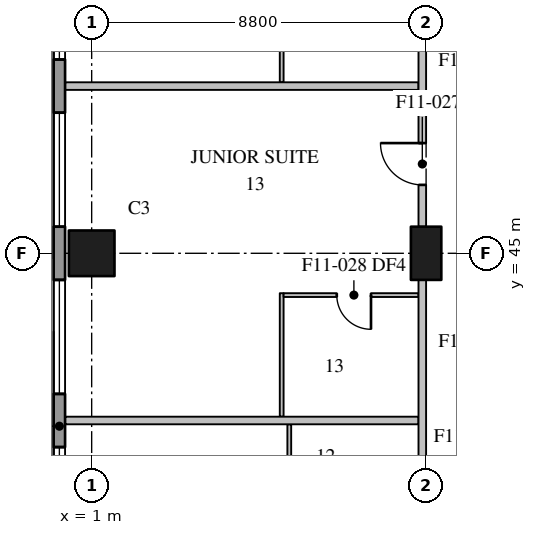
"""IFC4 building model, lengths in metres.
Left out: names, types, materials, properties, quantities, classifications, styles, units other than length and angle.
Written with IfcOpenShell. Run it as: python <this file> out.ifc"""

import sys

from ifc_helpers import new_model, si_unit, direction, frame, frame_2d, origin, origin_2d, place, context, subcontext, project, spatial, rectangle, extrude, element, fill, save


model = new_model("IFC4")
c1 = context("Model", 3, precision=1e-05, world=origin(), true_north=direction((0.0, 1.0)))
c2 = subcontext(c1, "Body", "Model", "MODEL_VIEW")
j1 = project(units=[si_unit("LENGTHUNIT", "METRE"), si_unit("PLANEANGLEUNIT", "RADIAN")], contexts=[c1])
p1 = place(None, origin())
s1 = spatial("IfcSite", under=j1, at=p1, CompositionType="ELEMENT")
p2 = place(p1, origin())
s2 = spatial("IfcBuilding", under=s1, at=p2, CompositionType="ELEMENT")
p3 = place(p2, frame((0.0, 0.0, 111.1)))
s3 = spatial("IfcBuildingStorey", under=s2, at=p3, CompositionType="ELEMENT", Elevation=111.1)
p4 = place(p3, frame((1.0, 45.0, 0.0), z_axis=(0.0, 0.0, 1.0), x_axis=(1.0, 0.0, 0.0)))
e1 = element("IfcColumn", 1, at=p4, inside=s3, PredefinedType="COLUMN", context=c2, shape_type="SweptSolid", body=[
    extrude(rectangle(XDim=1.2, YDim=1.2, at=origin_2d()), origin(), (0.0, 0.0, 1.0), 3.7),
])
p5 = place(p3, frame((9.8, 45.0, 0.0), z_axis=(0.0, 0.0, 1.0), x_axis=(0.0, 1.0, 0.0)))
e2 = element("IfcColumn", 2, at=p5, inside=s3, PredefinedType="COLUMN", context=c2, shape_type="SweptSolid", body=[
    extrude(rectangle(XDim=1.4, YDim=0.8, at=origin_2d()), origin(), (0.0, 0.0, 1.0), 3.7),
])
p6 = place(p3, frame((0.15, 78.7, 0.0), z_axis=(0.0, 0.0, 1.0), x_axis=(0.0, -1.0, 0.0)))
e3 = element("IfcWall", 3, at=p6, inside=s3, PredefinedType="STANDARD", context=c2, shape_type="SweptSolid", body=[
    extrude(rectangle(XDim=76.5, YDim=0.3, at=frame_2d((38.25, 0.0))), origin(), (0.0, 0.0, 1.0), 3.4),
])
p7 = place(p6, frame((3.6, 0.0, 0.75)))
e4 = element("IfcOpeningElement", 4, at=p7, cuts=e3, PredefinedType="OPENING", context=c2, shape_type="SweptSolid", body=[
    extrude(rectangle(XDim=3.0, YDim=2.3, at=frame_2d((1.5, 1.15))), frame((0.0, 0.16, 0.0), z_axis=(0.0, -1.0, 0.0), x_axis=(1.0, 0.0, 0.0)), (0.0, 0.0, 1.0), 0.32),
])
p8 = place(p6, frame((8.0, 0.0, 0.75)))
e5 = element("IfcOpeningElement", 5, at=p8, cuts=e3, PredefinedType="OPENING", context=c2, shape_type="SweptSolid", body=[
    extrude(rectangle(XDim=3.0, YDim=2.3, at=frame_2d((1.5, 1.15))), frame((0.0, 0.16, 0.0), z_axis=(0.0, -1.0, 0.0), x_axis=(1.0, 0.0, 0.0)), (0.0, 0.0, 1.0), 0.32),
])
p9 = place(p6, frame((12.4, 0.0, 0.75)))
e6 = element("IfcOpeningElement", 6, at=p9, cuts=e3, PredefinedType="OPENING", context=c2, shape_type="SweptSolid", body=[
    extrude(rectangle(XDim=3.0, YDim=2.3, at=frame_2d((1.5, 1.15))), frame((0.0, 0.16, 0.0), z_axis=(0.0, -1.0, 0.0), x_axis=(1.0, 0.0, 0.0)), (0.0, 0.0, 1.0), 0.32),
])
p10 = place(p6, frame((16.8, 0.0, 0.75)))
e7 = element("IfcOpeningElement", 7, at=p10, cuts=e3, PredefinedType="OPENING", context=c2, shape_type="SweptSolid", body=[
    extrude(rectangle(XDim=3.0, YDim=2.3, at=frame_2d((1.5, 1.15))), frame((0.0, 0.16, 0.0), z_axis=(0.0, -1.0, 0.0), x_axis=(1.0, 0.0, 0.0)), (0.0, 0.0, 1.0), 0.32),
])
p11 = place(p6, frame((21.2, 0.0, 0.75)))
e8 = element("IfcOpeningElement", 8, at=p11, cuts=e3, PredefinedType="OPENING", context=c2, shape_type="SweptSolid", body=[
    extrude(rectangle(XDim=3.0, YDim=2.3, at=frame_2d((1.5, 1.15))), frame((0.0, 0.16, 0.0), z_axis=(0.0, -1.0, 0.0), x_axis=(1.0, 0.0, 0.0)), (0.0, 0.0, 1.0), 0.32),
])
p12 = place(p6, frame((25.6, 0.0, 0.75)))
e9 = element("IfcOpeningElement", 9, at=p12, cuts=e3, PredefinedType="OPENING", context=c2, shape_type="SweptSolid", body=[
    extrude(rectangle(XDim=3.0, YDim=2.3, at=frame_2d((1.5, 1.15))), frame((0.0, 0.16, 0.0), z_axis=(0.0, -1.0, 0.0), x_axis=(1.0, 0.0, 0.0)), (0.0, 0.0, 1.0), 0.32),
])
p13 = place(p6, frame((30.0, 0.0, 0.75)))
e10 = element("IfcOpeningElement", 10, at=p13, cuts=e3, PredefinedType="OPENING", context=c2, shape_type="SweptSolid", body=[
    extrude(rectangle(XDim=3.0, YDim=2.3, at=frame_2d((1.5, 1.15))), frame((0.0, 0.16, 0.0), z_axis=(0.0, -1.0, 0.0), x_axis=(1.0, 0.0, 0.0)), (0.0, 0.0, 1.0), 0.32),
])
p14 = place(p6, frame((34.4, 0.0, 0.75)))
e11 = element("IfcOpeningElement", 11, at=p14, cuts=e3, PredefinedType="OPENING", context=c2, shape_type="SweptSolid", body=[
    extrude(rectangle(XDim=3.0, YDim=2.3, at=frame_2d((1.5, 1.15))), frame((0.0, 0.16, 0.0), z_axis=(0.0, -1.0, 0.0), x_axis=(1.0, 0.0, 0.0)), (0.0, 0.0, 1.0), 0.32),
])
p15 = place(p6, frame((38.8, 0.0, 0.75)))
e12 = element("IfcOpeningElement", 12, at=p15, cuts=e3, PredefinedType="OPENING", context=c2, shape_type="SweptSolid", body=[
    extrude(rectangle(XDim=3.0, YDim=2.3, at=frame_2d((1.5, 1.15))), frame((0.0, 0.16, 0.0), z_axis=(0.0, -1.0, 0.0), x_axis=(1.0, 0.0, 0.0)), (0.0, 0.0, 1.0), 0.32),
])
p16 = place(p6, frame((43.2, 0.0, 0.75)))
e13 = element("IfcOpeningElement", 13, at=p16, cuts=e3, PredefinedType="OPENING", context=c2, shape_type="SweptSolid", body=[
    extrude(rectangle(XDim=3.0, YDim=2.3, at=frame_2d((1.5, 1.15))), frame((0.0, 0.16, 0.0), z_axis=(0.0, -1.0, 0.0), x_axis=(1.0, 0.0, 0.0)), (0.0, 0.0, 1.0), 0.32),
])
p17 = place(p6, frame((47.6, 0.0, 0.75)))
e14 = element("IfcOpeningElement", 14, at=p17, cuts=e3, PredefinedType="OPENING", context=c2, shape_type="SweptSolid", body=[
    extrude(rectangle(XDim=3.0, YDim=2.3, at=frame_2d((1.5, 1.15))), frame((0.0, 0.16, 0.0), z_axis=(0.0, -1.0, 0.0), x_axis=(1.0, 0.0, 0.0)), (0.0, 0.0, 1.0), 0.32),
])
p18 = place(p6, frame((52.0, 0.0, 0.75)))
e15 = element("IfcOpeningElement", 15, at=p18, cuts=e3, PredefinedType="OPENING", context=c2, shape_type="SweptSolid", body=[
    extrude(rectangle(XDim=3.0, YDim=2.3, at=frame_2d((1.5, 1.15))), frame((0.0, 0.16, 0.0), z_axis=(0.0, -1.0, 0.0), x_axis=(1.0, 0.0, 0.0)), (0.0, 0.0, 1.0), 0.32),
])
p19 = place(p6, frame((56.4, 0.0, 0.75)))
e16 = element("IfcOpeningElement", 16, at=p19, cuts=e3, PredefinedType="OPENING", context=c2, shape_type="SweptSolid", body=[
    extrude(rectangle(XDim=3.0, YDim=2.3, at=frame_2d((1.5, 1.15))), frame((0.0, 0.16, 0.0), z_axis=(0.0, -1.0, 0.0), x_axis=(1.0, 0.0, 0.0)), (0.0, 0.0, 1.0), 0.32),
])
p20 = place(p6, frame((60.8, 0.0, 0.75)))
e17 = element("IfcOpeningElement", 17, at=p20, cuts=e3, PredefinedType="OPENING", context=c2, shape_type="SweptSolid", body=[
    extrude(rectangle(XDim=3.0, YDim=2.3, at=frame_2d((1.5, 1.15))), frame((0.0, 0.16, 0.0), z_axis=(0.0, -1.0, 0.0), x_axis=(1.0, 0.0, 0.0)), (0.0, 0.0, 1.0), 0.32),
])
p21 = place(p6, frame((65.2, 0.0, 0.75)))
e18 = element("IfcOpeningElement", 18, at=p21, cuts=e3, PredefinedType="OPENING", context=c2, shape_type="SweptSolid", body=[
    extrude(rectangle(XDim=3.0, YDim=2.3, at=frame_2d((1.5, 1.15))), frame((0.0, 0.16, 0.0), z_axis=(0.0, -1.0, 0.0), x_axis=(1.0, 0.0, 0.0)), (0.0, 0.0, 1.0), 0.32),
])
p22 = place(p6, frame((69.6, 0.0, 0.75)))
e19 = element("IfcOpeningElement", 19, at=p22, cuts=e3, PredefinedType="OPENING", context=c2, shape_type="SweptSolid", body=[
    extrude(rectangle(XDim=3.0, YDim=2.3, at=frame_2d((1.5, 1.15))), frame((0.0, 0.16, 0.0), z_axis=(0.0, -1.0, 0.0), x_axis=(1.0, 0.0, 0.0)), (0.0, 0.0, 1.0), 0.32),
])
p23 = place(p3, frame((9.7, 36.9, 0.0), z_axis=(0.0, 0.0, 1.0), x_axis=(0.0, 1.0, 0.0)))
e20 = element("IfcWall", 20, at=p23, inside=s3, PredefinedType="PARTITIONING", context=c2, shape_type="SweptSolid", body=[
    extrude(rectangle(XDim=7.4, YDim=0.2, at=frame_2d((3.7, 0.0))), origin(), (0.0, 0.0, 1.0), 3.4),
])
p24 = place(p23, frame((0.05, 0.0, 0.0)))
e21 = element("IfcOpeningElement", 21, at=p24, cuts=e20, PredefinedType="OPENING", context=c2, shape_type="SweptSolid", body=[
    extrude(rectangle(XDim=1.0, YDim=2.1, at=frame_2d((0.5, 1.05))), frame((0.0, 0.11, 0.0), z_axis=(0.0, -1.0, 0.0), x_axis=(1.0, 0.0, 0.0)), (0.0, 0.0, 1.0), 0.22),
])
p25 = place(p3, frame((9.7, 45.7, 0.0), z_axis=(0.0, 0.0, 1.0), x_axis=(0.0, 1.0, 0.0)))
e22 = element("IfcWall", 22, at=p25, inside=s3, PredefinedType="PARTITIONING", context=c2, shape_type="SweptSolid", body=[
    extrude(rectangle(XDim=7.4, YDim=0.2, at=frame_2d((3.7, 0.0))), origin(), (0.0, 0.0, 1.0), 3.4),
])
p26 = place(p25, frame((1.1, 0.0, 0.0)))
e23 = element("IfcOpeningElement", 23, at=p26, cuts=e22, PredefinedType="OPENING", context=c2, shape_type="SweptSolid", body=[
    extrude(rectangle(XDim=1.1, YDim=2.1, at=frame_2d((0.55, 1.05))), frame((0.0, 0.11, 0.0), z_axis=(0.0, -1.0, 0.0), x_axis=(1.0, 0.0, 0.0)), (0.0, 0.0, 1.0), 0.22),
])
for number, where, z_axis, x_axis in (
    (24, (0.31, 40.6, 0.0), (0.0, 0.0, 1.0), (1.0, 0.0, 0.0)),
    (25, (0.31, 49.4, 0.0), (0.0, 0.0, 1.0), (1.0, 0.0, 0.0)),
):
    element("IfcWall", number, at=place(p3, frame(where, z_axis=z_axis, x_axis=x_axis)), inside=s3, PredefinedType="PARTITIONING", context=c2, shape_type="SweptSolid", body=[
        extrude(rectangle(XDim=9.29, YDim=0.2, at=frame_2d((4.645, 0.0))), origin(), (0.0, 0.0, 1.0), 3.4),
    ])
p27 = place(p3, frame((6.2, 38.55, 0.0), z_axis=(0.0, 0.0, 1.0), x_axis=(0.0, 1.0, 0.0)))
e26 = element("IfcWall", 26, at=p27, inside=s3, PredefinedType="PARTITIONING", context=c2, shape_type="SweptSolid", body=[
    extrude(rectangle(XDim=1.95, YDim=0.1, at=frame_2d((0.975, 0.0))), origin(), (0.0, 0.0, 1.0), 3.4),
])
for number, where, z_axis, x_axis in (
    (27, (6.0, 40.7, 0.0), (0.0, 0.0, 1.0), (0.0, 1.0, 0.0)),
    (28, (6.0, 49.5, 0.0), (0.0, 0.0, 1.0), (0.0, 1.0, 0.0)),
):
    element("IfcWall", number, at=place(p3, frame(where, z_axis=z_axis, x_axis=x_axis)), inside=s3, PredefinedType="PARTITIONING", context=c2, shape_type="SweptSolid", body=[
        extrude(rectangle(XDim=3.25, YDim=0.1, at=frame_2d((1.625, 0.0))), origin(), (0.0, 0.0, 1.0), 3.4),
    ])
p28 = place(p3, frame((9.6, 43.9, 0.0), z_axis=(0.0, 0.0, 1.0), x_axis=(-1.0, 0.0, 0.0)))
e29 = element("IfcWall", 29, at=p28, inside=s3, PredefinedType="PARTITIONING", context=c2, shape_type="SweptSolid", body=[
    extrude(rectangle(XDim=3.55, YDim=0.1, at=frame_2d((1.775, 0.0))), origin(), (0.0, 0.0, 1.0), 3.4),
])
p29 = place(p28, frame((1.25, 0.0, 0.0)))
e30 = element("IfcOpeningElement", 30, at=p29, cuts=e29, PredefinedType="OPENING", context=c2, shape_type="SweptSolid", body=[
    extrude(rectangle(XDim=0.9, YDim=2.1, at=frame_2d((0.45, 1.05))), frame((0.0, 0.06, 0.0), z_axis=(0.0, -1.0, 0.0), x_axis=(1.0, 0.0, 0.0)), (0.0, 0.0, 1.0), 0.12),
])
p30 = place(p12, origin())
e31 = element("IfcWindow", 31, at=p30, inside=s3, PartitioningType="SINGLE_PANEL", PredefinedType="WINDOW", context=c2, shape_type="SweptSolid", body=[
    extrude(rectangle(XDim=3.0, YDim=2.3, at=frame_2d((1.5, 1.15))), frame((0.0, 0.03, 0.0), z_axis=(0.0, -1.0, 0.0), x_axis=(1.0, 0.0, 0.0)), (0.0, 0.0, 1.0), 0.06),
])
fill(e9, e31)
p31 = place(p13, origin())
e32 = element("IfcWindow", 32, at=p31, inside=s3, PartitioningType="SINGLE_PANEL", PredefinedType="WINDOW", context=c2, shape_type="SweptSolid", body=[
    extrude(rectangle(XDim=3.0, YDim=2.3, at=frame_2d((1.5, 1.15))), frame((0.0, 0.03, 0.0), z_axis=(0.0, -1.0, 0.0), x_axis=(1.0, 0.0, 0.0)), (0.0, 0.0, 1.0), 0.06),
])
fill(e10, e32)
p32 = place(p14, origin())
e33 = element("IfcWindow", 33, at=p32, inside=s3, PartitioningType="SINGLE_PANEL", PredefinedType="WINDOW", context=c2, shape_type="SweptSolid", body=[
    extrude(rectangle(XDim=3.0, YDim=2.3, at=frame_2d((1.5, 1.15))), frame((0.0, 0.03, 0.0), z_axis=(0.0, -1.0, 0.0), x_axis=(1.0, 0.0, 0.0)), (0.0, 0.0, 1.0), 0.06),
])
fill(e11, e33)
p33 = place(p15, origin())
e34 = element("IfcWindow", 34, at=p33, inside=s3, PartitioningType="SINGLE_PANEL", PredefinedType="WINDOW", context=c2, shape_type="SweptSolid", body=[
    extrude(rectangle(XDim=3.0, YDim=2.3, at=frame_2d((1.5, 1.15))), frame((0.0, 0.03, 0.0), z_axis=(0.0, -1.0, 0.0), x_axis=(1.0, 0.0, 0.0)), (0.0, 0.0, 1.0), 0.06),
])
fill(e12, e34)
p34 = place(p26, origin())
e35 = element("IfcDoor", 35, at=p34, inside=s3, OperationType="SINGLE_SWING_RIGHT", PredefinedType="DOOR", context=c2, shape_type="SweptSolid", body=[
    extrude(rectangle(XDim=1.1, YDim=2.1, at=frame_2d((0.55, 1.05))), frame((0.0, 0.025, 0.0), z_axis=(0.0, -1.0, 0.0), x_axis=(1.0, 0.0, 0.0)), (0.0, 0.0, 1.0), 0.05),
])
fill(e23, e35)
p35 = place(p29, origin())
e36 = element("IfcDoor", 36, at=p35, inside=s3, OperationType="SINGLE_SWING_LEFT", PredefinedType="DOOR", context=c2, shape_type="SweptSolid", body=[
    extrude(rectangle(XDim=0.9, YDim=2.1, at=frame_2d((0.45, 1.05))), frame((0.0, 0.025, 0.0), z_axis=(0.0, -1.0, 0.0), x_axis=(1.0, 0.0, 0.0)), (0.0, 0.0, 1.0), 0.05),
])
fill(e30, e36)
save(model, sys.argv[1])
